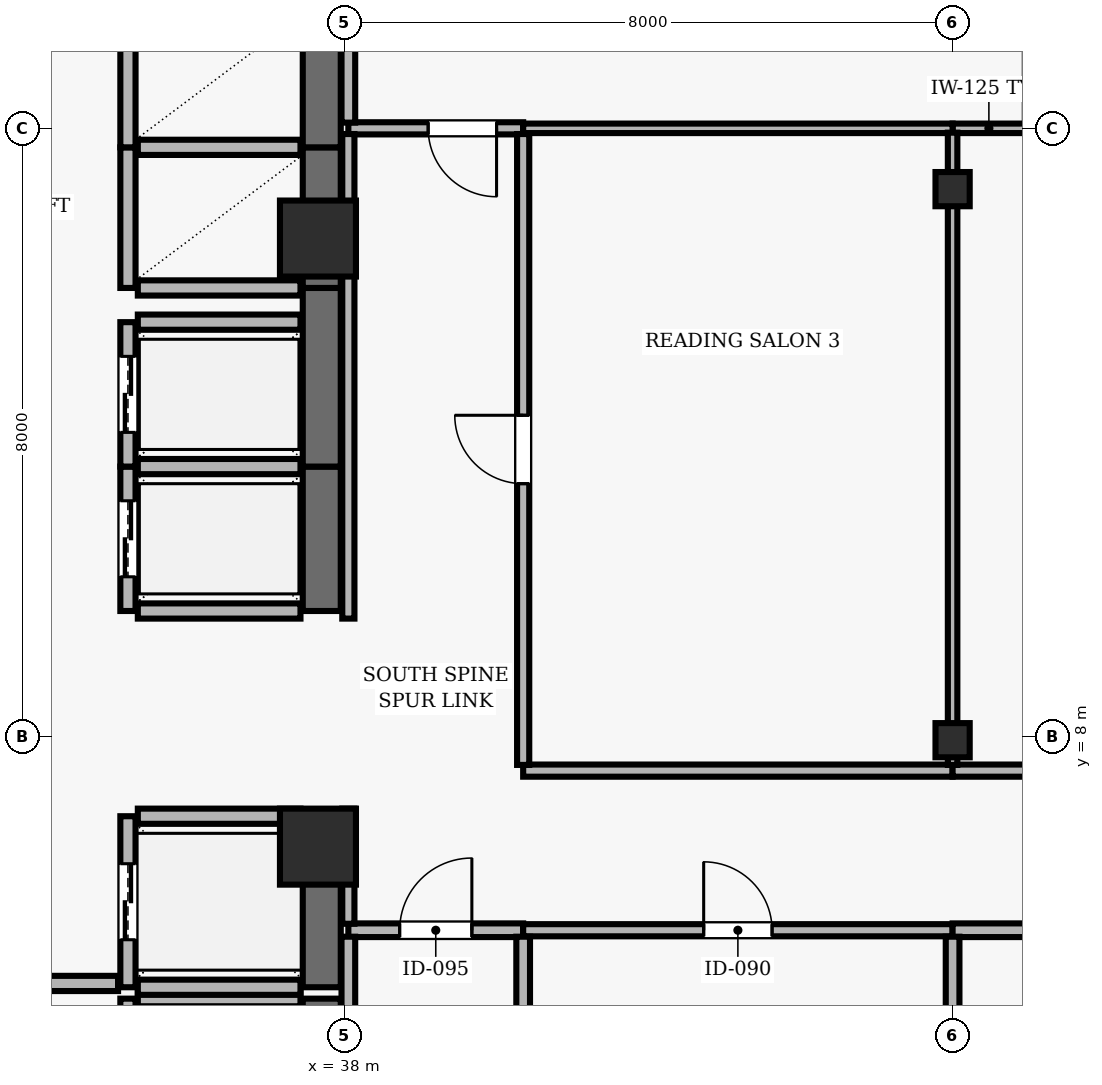
"""IFC4 building model, lengths in metres.
Left out: names, types, materials, properties, quantities, classifications, styles, units other than length and angle.
Written with IfcOpenShell. Run it as: python <this file> out.ifc"""

import sys

from ifc_helpers import new_model, si_unit, direction, frame, frame_2d, origin, origin_2d, place, context, subcontext, project, spatial, rectangle, hollow_rectangle, extrude, element, fill, save


model = new_model("IFC4")
c1 = context("Model", 3, precision=1e-05, world=origin(), true_north=direction((0.0, 1.0)))
c2 = subcontext(c1, "Body", "Model", "MODEL_VIEW")
j1 = project(units=[si_unit("LENGTHUNIT", "METRE"), si_unit("PLANEANGLEUNIT", "RADIAN")], contexts=[c1])
p1 = place(None, origin())
s1 = spatial("IfcSite", under=j1, at=p1, CompositionType="ELEMENT")
p2 = place(p1, origin())
s2 = spatial("IfcBuilding", under=s1, at=p2, CompositionType="ELEMENT")
p3 = place(p2, frame((0.0, 0.0, 199.2)))
s3 = spatial("IfcBuildingStorey", under=s2, at=p3, CompositionType="ELEMENT", Elevation=199.2)
for number, where, z_axis, x_axis in (
    (1, (37.65, 6.55, 0.0), (0.0, 0.0, 1.0), (1.0, 0.0, 0.0)),
    (2, (37.65, 14.55, 0.0), (0.0, 0.0, 1.0), (1.0, 0.0, 0.0)),
):
    element("IfcColumn", number, at=place(p3, frame(where, z_axis=z_axis, x_axis=x_axis)), inside=s3, PredefinedType="COLUMN", context=c2, shape_type="SweptSolid", body=[
        extrude(rectangle(XDim=1.0, YDim=1.0, at=origin_2d()), origin(), (0.0, 0.0, 1.0), 3.9),
    ])
for number, where, z_axis, x_axis in (
    (3, (46.0, 7.95, 0.0), (0.0, 0.0, 1.0), (1.0, 0.0, 0.0)),
    (4, (46.0, 15.2, 0.0), (0.0, 0.0, 1.0), (1.0, 0.0, 0.0)),
):
    element("IfcColumn", number, at=place(p3, frame(where, z_axis=z_axis, x_axis=x_axis)), inside=s3, PredefinedType="COLUMN", context=c2, shape_type="SweptSolid", body=[
        extrude(hollow_rectangle(XDim=0.45, YDim=0.45, WallThickness=0.02, at=origin_2d()), origin(), (0.0, 0.0, 1.0), 3.9),
    ])
p4 = place(p3, frame((35.15, 4.55, 0.0), z_axis=(0.0, 0.0, 1.0), x_axis=(0.0, -1.0, 0.0)))
e5 = element("IfcWall", 5, at=p4, inside=s3, PredefinedType="SOLIDWALL", context=c2, shape_type="SweptSolid", body=[
    extrude(rectangle(XDim=2.1, YDim=0.2, at=frame_2d((1.05, 0.0))), origin(), (0.0, 0.0, 1.0), 3.69),
])
p5 = place(p4, frame((0.45, 0.0, 0.0)))
e6 = element("IfcOpeningElement", 6, at=p5, cuts=e5, PredefinedType="OPENING", context=c2, shape_type="SweptSolid", body=[
    extrude(rectangle(XDim=1.2, YDim=2.15, at=frame_2d((0.6, 1.075))), frame((0.0, 0.11, 0.0), z_axis=(0.0, -1.0, 0.0), x_axis=(1.0, 0.0, 0.0)), (0.0, 0.0, 1.0), 0.22),
])
p6 = place(p3, frame((37.7, 2.45, 0.0), z_axis=(0.0, 0.0, 1.0), x_axis=(0.0, 1.0, 0.0)))
e7 = element("IfcWall", 7, at=p6, inside=s3, PredefinedType="SHEAR", context=c2, shape_type="SweptSolid", body=[
    extrude(rectangle(XDim=2.1, YDim=0.5, at=frame_2d((1.05, 0.0))), origin(), (0.0, 0.0, 1.0), 3.69),
])
p7 = place(p3, frame((37.42, 4.55, 0.0), z_axis=(0.0, 0.0, 1.0), x_axis=(-1.0, 0.0, 0.0)))
e8 = element("IfcWall", 8, at=p7, inside=s3, PredefinedType="SOLIDWALL", context=c2, shape_type="SweptSolid", body=[
    extrude(rectangle(XDim=2.14, YDim=0.2, at=frame_2d((1.07, 0.0))), origin(), (0.0, 0.0, 1.0), 3.69),
])
p8 = place(p3, frame((35.15, 6.95, 0.0), z_axis=(0.0, 0.0, 1.0), x_axis=(0.0, -1.0, 0.0)))
e9 = element("IfcWall", 9, at=p8, inside=s3, PredefinedType="SOLIDWALL", context=c2, shape_type="SweptSolid", body=[
    extrude(rectangle(XDim=2.25, YDim=0.2, at=frame_2d((1.125, 0.0))), origin(), (0.0, 0.0, 1.0), 3.69),
])
p9 = place(p8, frame((0.625, 0.0, 0.0)))
e10 = element("IfcOpeningElement", 10, at=p9, cuts=e9, PredefinedType="OPENING", context=c2, shape_type="SweptSolid", body=[
    extrude(rectangle(XDim=1.0, YDim=2.1, at=frame_2d((0.5, 1.05))), frame((0.0, 0.11, 0.0), z_axis=(0.0, -1.0, 0.0), x_axis=(1.0, 0.0, 0.0)), (0.0, 0.0, 1.0), 0.22),
])
p10 = place(p3, frame((37.7, 4.7, 0.0), z_axis=(0.0, 0.0, 1.0), x_axis=(0.0, 1.0, 0.0)))
e11 = element("IfcWall", 11, at=p10, inside=s3, PredefinedType="SHEAR", context=c2, shape_type="SweptSolid", body=[
    extrude(rectangle(XDim=2.25, YDim=0.5, at=frame_2d((1.125, 0.0))), origin(), (0.0, 0.0, 1.0), 3.69),
])
for number, where, z_axis, x_axis in (
    (12, (35.28, 4.7, 0.0), (0.0, 0.0, 1.0), (1.0, 0.0, 0.0)),
    (13, (37.42, 6.95, 0.0), (0.0, 0.0, 1.0), (-1.0, 0.0, 0.0)),
):
    element("IfcWall", number, at=place(p3, frame(where, z_axis=z_axis, x_axis=x_axis)), inside=s3, PredefinedType="SOLIDWALL", context=c2, shape_type="SweptSolid", body=[
        extrude(rectangle(XDim=2.14, YDim=0.2, at=frame_2d((1.07, 0.0))), origin(), (0.0, 0.0, 1.0), 3.69),
    ])
p11 = place(p3, frame((35.15, 11.55, 0.0), z_axis=(0.0, 0.0, 1.0), x_axis=(0.0, -1.0, 0.0)))
e14 = element("IfcWall", 14, at=p11, inside=s3, PredefinedType="SOLIDWALL", context=c2, shape_type="SweptSolid", body=[
    extrude(rectangle(XDim=1.9, YDim=0.2, at=frame_2d((0.95, 0.0))), origin(), (0.0, 0.0, 1.0), 3.69),
])
p12 = place(p11, frame((0.45, 0.0, 0.0)))
e15 = element("IfcOpeningElement", 15, at=p12, cuts=e14, PredefinedType="OPENING", context=c2, shape_type="SweptSolid", body=[
    extrude(rectangle(XDim=1.0, YDim=2.1, at=frame_2d((0.5, 1.05))), frame((0.0, 0.11, 0.0), z_axis=(0.0, -1.0, 0.0), x_axis=(1.0, 0.0, 0.0)), (0.0, 0.0, 1.0), 0.22),
])
p13 = place(p3, frame((37.7, 9.65, 0.0), z_axis=(0.0, 0.0, 1.0), x_axis=(0.0, 1.0, 0.0)))
e16 = element("IfcWall", 16, at=p13, inside=s3, PredefinedType="SHEAR", context=c2, shape_type="SweptSolid", body=[
    extrude(rectangle(XDim=1.9, YDim=0.5, at=frame_2d((0.95, 0.0))), origin(), (0.0, 0.0, 1.0), 3.69),
])
for number, where, z_axis, x_axis in (
    (17, (35.28, 9.65, 0.0), (0.0, 0.0, 1.0), (1.0, 0.0, 0.0)),
    (18, (37.42, 11.55, 0.0), (0.0, 0.0, 1.0), (-1.0, 0.0, 0.0)),
):
    element("IfcWall", number, at=place(p3, frame(where, z_axis=z_axis, x_axis=x_axis)), inside=s3, PredefinedType="SOLIDWALL", context=c2, shape_type="SweptSolid", body=[
        extrude(rectangle(XDim=2.14, YDim=0.2, at=frame_2d((1.07, 0.0))), origin(), (0.0, 0.0, 1.0), 3.69),
    ])
p14 = place(p3, frame((35.15, 13.45, 0.0), z_axis=(0.0, 0.0, 1.0), x_axis=(0.0, -1.0, 0.0)))
e19 = element("IfcWall", 19, at=p14, inside=s3, PredefinedType="SOLIDWALL", context=c2, shape_type="SweptSolid", body=[
    extrude(rectangle(XDim=1.9, YDim=0.2, at=frame_2d((0.95, 0.0))), origin(), (0.0, 0.0, 1.0), 3.69),
])
p15 = place(p14, frame((0.45, 0.0, 0.0)))
e20 = element("IfcOpeningElement", 20, at=p15, cuts=e19, PredefinedType="OPENING", context=c2, shape_type="SweptSolid", body=[
    extrude(rectangle(XDim=1.0, YDim=2.1, at=frame_2d((0.5, 1.05))), frame((0.0, 0.11, 0.0), z_axis=(0.0, -1.0, 0.0), x_axis=(1.0, 0.0, 0.0)), (0.0, 0.0, 1.0), 0.22),
])
p16 = place(p3, frame((37.7, 11.55, 0.0), z_axis=(0.0, 0.0, 1.0), x_axis=(0.0, 1.0, 0.0)))
e21 = element("IfcWall", 21, at=p16, inside=s3, PredefinedType="SHEAR", context=c2, shape_type="SweptSolid", body=[
    extrude(rectangle(XDim=2.35, YDim=0.5, at=frame_2d((1.175, 0.0))), origin(), (0.0, 0.0, 1.0), 3.69),
])
p17 = place(p3, frame((37.42, 13.45, 0.0), z_axis=(0.0, 0.0, 1.0), x_axis=(-1.0, 0.0, 0.0)))
e22 = element("IfcWall", 22, at=p17, inside=s3, PredefinedType="SOLIDWALL", context=c2, shape_type="SweptSolid", body=[
    extrude(rectangle(XDim=2.14, YDim=0.2, at=frame_2d((1.07, 0.0))), origin(), (0.0, 0.0, 1.0), 3.69),
])
p18 = place(p3, frame((35.15, 15.75, 0.0), z_axis=(0.0, 0.0, 1.0), x_axis=(0.0, -1.0, 0.0)))
e23 = element("IfcWall", 23, at=p18, inside=s3, PredefinedType="SOLIDWALL", context=c2, shape_type="SweptSolid", body=[
    extrude(rectangle(XDim=1.85, YDim=0.2, at=frame_2d((0.925, 0.0))), origin(), (0.0, 0.0, 1.0), 3.69),
])
p19 = place(p3, frame((37.7, 13.9, 0.0), z_axis=(0.0, 0.0, 1.0), x_axis=(0.0, 1.0, 0.0)))
e24 = element("IfcWall", 24, at=p19, inside=s3, PredefinedType="SHEAR", context=c2, shape_type="SweptSolid", body=[
    extrude(rectangle(XDim=1.85, YDim=0.5, at=frame_2d((0.925, 0.0))), origin(), (0.0, 0.0, 1.0), 3.69),
])
for number, where, z_axis, x_axis in (
    (25, (35.28, 13.9, 0.0), (0.0, 0.0, 1.0), (1.0, 0.0, 0.0)),
    (26, (37.42, 15.75, 0.0), (0.0, 0.0, 1.0), (-1.0, 0.0, 0.0)),
):
    element("IfcWall", number, at=place(p3, frame(where, z_axis=z_axis, x_axis=x_axis)), inside=s3, PredefinedType="SOLIDWALL", context=c2, shape_type="SweptSolid", body=[
        extrude(rectangle(XDim=2.14, YDim=0.2, at=frame_2d((1.07, 0.0))), origin(), (0.0, 0.0, 1.0), 3.69),
    ])
p20 = place(p3, frame((35.15, 17.6, 0.0), z_axis=(0.0, 0.0, 1.0), x_axis=(0.0, -1.0, 0.0)))
e27 = element("IfcWall", 27, at=p20, inside=s3, PredefinedType="SOLIDWALL", context=c2, shape_type="SweptSolid", body=[
    extrude(rectangle(XDim=1.85, YDim=0.2, at=frame_2d((0.925, 0.0))), origin(), (0.0, 0.0, 1.0), 3.69),
])
p21 = place(p3, frame((37.7, 15.75, 0.0), z_axis=(0.0, 0.0, 1.0), x_axis=(0.0, 1.0, 0.0)))
e28 = element("IfcWall", 28, at=p21, inside=s3, PredefinedType="SHEAR", context=c2, shape_type="SweptSolid", body=[
    extrude(rectangle(XDim=1.85, YDim=0.5, at=frame_2d((0.925, 0.0))), origin(), (0.0, 0.0, 1.0), 3.69),
])
p22 = place(p3, frame((35.02, 4.75, 0.0), z_axis=(0.0, 0.0, 1.0), x_axis=(-1.0, 0.0, 0.0)))
e29 = element("IfcWall", 29, at=p22, inside=s3, PredefinedType="SOLIDWALL", context=c2, shape_type="SweptSolid", body=[
    extrude(rectangle(XDim=3.11, YDim=0.2, at=frame_2d((1.555, 0.0))), origin(), (0.0, 0.0, 1.0), 3.69),
])
p23 = place(p22, frame((1.03, 0.0, 0.0)))
e30 = element("IfcOpeningElement", 30, at=p23, cuts=e29, PredefinedType="OPENING", context=c2, shape_type="SweptSolid", body=[
    extrude(rectangle(XDim=1.05, YDim=2.15, at=frame_2d((0.525, 1.075))), frame((0.0, 0.11, 0.0), z_axis=(0.0, -1.0, 0.0), x_axis=(1.0, 0.0, 0.0)), (0.0, 0.0, 1.0), 0.22),
])
p24 = place(p3, frame((38.05, 5.45, 0.0), z_axis=(0.0, 0.0, 1.0), x_axis=(1.0, 0.0, 0.0)))
e31 = element("IfcWall", 31, at=p24, inside=s3, PredefinedType="PARTITIONING", context=c2, shape_type="SweptSolid", body=[
    extrude(rectangle(XDim=2.3, YDim=0.18, at=frame_2d((1.15, 0.0))), origin(), (0.0, 0.0, 1.0), 3.343),
])
p25 = place(p24, frame((0.675, 0.0, 0.0)))
e32 = element("IfcOpeningElement", 32, at=p25, cuts=e31, PredefinedType="OPENING", context=c2, shape_type="SweptSolid", body=[
    extrude(rectangle(XDim=0.95, YDim=2.1, at=frame_2d((0.475, 1.05))), frame((0.0, 0.1, 0.0), z_axis=(0.0, -1.0, 0.0), x_axis=(1.0, 0.0, 0.0)), (0.0, 0.0, 1.0), 0.2),
])
p26 = place(p3, frame((40.35, 5.45, 0.0), z_axis=(0.0, 0.0, 1.0), x_axis=(1.0, 0.0, 0.0)))
e33 = element("IfcWall", 33, at=p26, inside=s3, PredefinedType="PARTITIONING", context=c2, shape_type="SweptSolid", body=[
    extrude(rectangle(XDim=5.65, YDim=0.16, at=frame_2d((2.825, 0.0))), origin(), (0.0, 0.0, 1.0), 3.343),
])
p27 = place(p26, frame((2.375, 0.0, 0.0)))
e34 = element("IfcOpeningElement", 34, at=p27, cuts=e33, PredefinedType="OPENING", context=c2, shape_type="SweptSolid", body=[
    extrude(rectangle(XDim=0.9, YDim=2.1, at=frame_2d((0.45, 1.05))), frame((0.0, 0.09, 0.0), z_axis=(0.0, -1.0, 0.0), x_axis=(1.0, 0.0, 0.0)), (0.0, 0.0, 1.0), 0.18),
])
p28 = place(p3, frame((40.35, 16.0, 0.0), z_axis=(0.0, 0.0, 1.0), x_axis=(-1.0, 0.0, 0.0)))
e35 = element("IfcWall", 35, at=p28, inside=s3, PredefinedType="PARTITIONING", context=c2, shape_type="SweptSolid", body=[
    extrude(rectangle(XDim=2.3, YDim=0.16, at=frame_2d((1.15, 0.0))), origin(), (0.0, 0.0, 1.0), 3.69),
])
p29 = place(p28, frame((0.35, 0.0, 0.0)))
e36 = element("IfcOpeningElement", 36, at=p29, cuts=e35, PredefinedType="OPENING", context=c2, shape_type="SweptSolid", body=[
    extrude(rectangle(XDim=0.9, YDim=2.1, at=frame_2d((0.45, 1.05))), frame((0.0, 0.09, 0.0), z_axis=(0.0, -1.0, 0.0), x_axis=(1.0, 0.0, 0.0)), (0.0, 0.0, 1.0), 0.18),
])
p30 = place(p3, frame((46.0, 5.45, 0.0), z_axis=(0.0, 0.0, 1.0), x_axis=(1.0, 0.0, 0.0)))
e37 = element("IfcWall", 37, at=p30, inside=s3, PredefinedType="PARTITIONING", context=c2, shape_type="SweptSolid", body=[
    extrude(rectangle(XDim=7.27, YDim=0.18, at=frame_2d((3.635, 0.0))), origin(), (0.0, 0.0, 1.0), 3.343),
])
p31 = place(p30, frame((3.16, 0.0, 0.0)))
e38 = element("IfcOpeningElement", 38, at=p31, cuts=e37, PredefinedType="OPENING", context=c2, shape_type="SweptSolid", body=[
    extrude(rectangle(XDim=0.95, YDim=2.1, at=frame_2d((0.475, 1.05))), frame((0.0, 0.1, 0.0), z_axis=(0.0, -1.0, 0.0), x_axis=(1.0, 0.0, 0.0)), (0.0, 0.0, 1.0), 0.2),
])
p32 = place(p3, frame((46.0, 7.55, 0.0), z_axis=(0.0, 0.0, 1.0), x_axis=(-1.0, 0.0, 0.0)))
e39 = element("IfcWall", 39, at=p32, inside=s3, PredefinedType="PARTITIONING", context=c2, shape_type="SweptSolid", body=[
    extrude(rectangle(XDim=5.65, YDim=0.16, at=frame_2d((2.825, 0.0))), origin(), (0.0, 0.0, 1.0), 3.139),
])
p33 = place(p3, frame((46.0, 16.0, 0.0), z_axis=(0.0, 0.0, 1.0), x_axis=(1.0, 0.0, 0.0)))
e40 = element("IfcWall", 40, at=p33, inside=s3, PredefinedType="PARTITIONING", context=c2, shape_type="SweptSolid", body=[
    extrude(rectangle(XDim=0.955, YDim=0.125, at=frame_2d((0.478, 0.0))), origin(), (0.0, 0.0, 1.0), 3.39),
])
p34 = place(p3, frame((46.0, 16.0, 0.0), z_axis=(0.0, 0.0, 1.0), x_axis=(-1.0, 0.0, 0.0)))
e41 = element("IfcWall", 41, at=p34, inside=s3, PredefinedType="PARTITIONING", context=c2, shape_type="SweptSolid", body=[
    extrude(rectangle(XDim=5.65, YDim=0.125, at=frame_2d((2.825, 0.0))), origin(), (0.0, 0.0, 1.0), 3.69),
])
p35 = place(p3, frame((53.27, 7.55, 0.0), z_axis=(0.0, 0.0, 1.0), x_axis=(-1.0, 0.0, 0.0)))
e42 = element("IfcWall", 42, at=p35, inside=s3, PredefinedType="PARTITIONING", context=c2, shape_type="SweptSolid", body=[
    extrude(rectangle(XDim=7.27, YDim=0.16, at=frame_2d((3.635, 0.0))), origin(), (0.0, 0.0, 1.0), 3.139),
])
p36 = place(p35, frame((3.185, 0.0, 0.0)))
e43 = element("IfcOpeningElement", 43, at=p36, cuts=e42, PredefinedType="OPENING", context=c2, shape_type="SweptSolid", body=[
    extrude(rectangle(XDim=0.9, YDim=2.1, at=frame_2d((0.45, 1.05))), frame((0.0, 0.09, 0.0), z_axis=(0.0, -1.0, 0.0), x_axis=(1.0, 0.0, 0.0)), (0.0, 0.0, 1.0), 0.18),
])
p37 = place(p3, frame((38.05, 5.365, 0.0), z_axis=(0.0, 0.0, 1.0), x_axis=(0.0, -1.0, 0.0)))
e44 = element("IfcWall", 44, at=p37, inside=s3, PredefinedType="PARTITIONING", context=c2, shape_type="SweptSolid", body=[
    extrude(rectangle(XDim=5.22, YDim=0.18, at=frame_2d((2.61, 0.0))), origin(), (0.0, 0.0, 1.0), 3.139),
])
p38 = place(p3, frame((38.05, 7.05, 0.0), z_axis=(0.0, 0.0, 1.0), x_axis=(0.0, -1.0, 0.0)))
e45 = element("IfcWall", 45, at=p38, inside=s3, PredefinedType="PARTITIONING", context=c2, shape_type="SweptSolid", body=[
    extrude(rectangle(XDim=1.515, YDim=0.16, at=frame_2d((0.758, 0.0))), origin(), (0.0, 0.0, 1.0), 3.139),
])
p39 = place(p3, frame((38.05, 15.925, 0.0), z_axis=(0.0, 0.0, 1.0), x_axis=(0.0, -1.0, 0.0)))
e46 = element("IfcWall", 46, at=p39, inside=s3, PredefinedType="PARTITIONING", context=c2, shape_type="SweptSolid", body=[
    extrude(rectangle(XDim=6.375, YDim=0.16, at=frame_2d((3.188, 0.0))), origin(), (0.0, 0.0, 1.0), 3.139),
])
p40 = place(p3, frame((38.05, 23.19, 0.0), z_axis=(0.0, 0.0, 1.0), x_axis=(0.0, -1.0, 0.0)))
e47 = element("IfcWall", 47, at=p40, inside=s3, PredefinedType="PARTITIONING", context=c2, shape_type="SweptSolid", body=[
    extrude(rectangle(XDim=7.115, YDim=0.18, at=frame_2d((3.558, 0.0))), origin(), (0.0, 0.0, 1.0), 3.139),
])
p41 = place(p3, frame((40.35, 0.145, 0.0), z_axis=(0.0, 0.0, 1.0), x_axis=(0.0, 1.0, 0.0)))
e48 = element("IfcWall", 48, at=p41, inside=s3, PredefinedType="PARTITIONING", context=c2, shape_type="SweptSolid", body=[
    extrude(rectangle(XDim=5.22, YDim=0.18, at=frame_2d((2.61, 0.0))), origin(), (0.0, 0.0, 1.0), 3.69),
])
p42 = place(p3, frame((40.35, 7.625, 0.0), z_axis=(0.0, 0.0, 1.0), x_axis=(0.0, 1.0, 0.0)))
e49 = element("IfcWall", 49, at=p42, inside=s3, PredefinedType="PARTITIONING", context=c2, shape_type="SweptSolid", body=[
    extrude(rectangle(XDim=8.3, YDim=0.16, at=frame_2d((4.15, 0.0))), origin(), (0.0, 0.0, 1.0), 3.343),
])
p43 = place(p42, frame((3.7, 0.0, 0.0)))
e50 = element("IfcOpeningElement", 50, at=p43, cuts=e49, PredefinedType="OPENING", context=c2, shape_type="SweptSolid", body=[
    extrude(rectangle(XDim=0.9, YDim=2.1, at=frame_2d((0.45, 1.05))), frame((0.0, 0.09, 0.0), z_axis=(0.0, -1.0, 0.0), x_axis=(1.0, 0.0, 0.0)), (0.0, 0.0, 1.0), 0.18),
])
p44 = place(p3, frame((46.0, 0.145, 0.0), z_axis=(0.0, 0.0, 1.0), x_axis=(0.0, 1.0, 0.0)))
e51 = element("IfcWall", 51, at=p44, inside=s3, PredefinedType="PARTITIONING", context=c2, shape_type="SweptSolid", body=[
    extrude(rectangle(XDim=5.22, YDim=0.18, at=frame_2d((2.61, 0.0))), origin(), (0.0, 0.0, 1.0), 3.139),
])
p45 = place(p3, frame((46.0, 7.625, 0.0), z_axis=(0.0, 0.0, 1.0), x_axis=(0.0, 1.0, 0.0)))
e52 = element("IfcWall", 52, at=p45, inside=s3, PredefinedType="PARTITIONING", context=c2, shape_type="SweptSolid", body=[
    extrude(rectangle(XDim=8.318, YDim=0.125, at=frame_2d((4.159, 0.0))), origin(), (0.0, 0.0, 1.0), 3.139),
])
p46 = place(p9, origin())
e53 = element("IfcDoor", 53, at=p46, inside=s3, OperationType="DOUBLE_DOOR_SLIDING", PredefinedType="DOOR", context=c2, shape_type="SweptSolid", body=[
    extrude(rectangle(XDim=1.0, YDim=2.1, at=frame_2d((0.5, 1.05))), frame((0.0, 0.025, 0.0), z_axis=(0.0, -1.0, 0.0), x_axis=(1.0, 0.0, 0.0)), (0.0, 0.0, 1.0), 0.05),
])
fill(e10, e53)
p47 = place(p12, origin())
e54 = element("IfcDoor", 54, at=p47, inside=s3, OperationType="DOUBLE_DOOR_SLIDING", PredefinedType="DOOR", context=c2, shape_type="SweptSolid", body=[
    extrude(rectangle(XDim=1.0, YDim=2.1, at=frame_2d((0.5, 1.05))), frame((0.0, 0.025, 0.0), z_axis=(0.0, -1.0, 0.0), x_axis=(1.0, 0.0, 0.0)), (0.0, 0.0, 1.0), 0.05),
])
fill(e15, e54)
p48 = place(p15, origin())
e55 = element("IfcDoor", 55, at=p48, inside=s3, OperationType="DOUBLE_DOOR_SLIDING", PredefinedType="DOOR", context=c2, shape_type="SweptSolid", body=[
    extrude(rectangle(XDim=1.0, YDim=2.1, at=frame_2d((0.5, 1.05))), frame((0.0, 0.025, 0.0), z_axis=(0.0, -1.0, 0.0), x_axis=(1.0, 0.0, 0.0)), (0.0, 0.0, 1.0), 0.05),
])
fill(e20, e55)
p49 = place(p25, origin())
e56 = element("IfcDoor", 56, at=p49, inside=s3, OperationType="SINGLE_SWING_RIGHT", PredefinedType="DOOR", context=c2, shape_type="SweptSolid", body=[
    extrude(rectangle(XDim=0.95, YDim=2.1, at=frame_2d((0.475, 1.05))), frame((0.0, 0.025, 0.0), z_axis=(0.0, -1.0, 0.0), x_axis=(1.0, 0.0, 0.0)), (0.0, 0.0, 1.0), 0.05),
])
fill(e32, e56)
p50 = place(p27, origin())
e57 = element("IfcDoor", 57, at=p50, inside=s3, OperationType="SINGLE_SWING_LEFT", PredefinedType="DOOR", context=c2, shape_type="SweptSolid", body=[
    extrude(rectangle(XDim=0.9, YDim=2.1, at=frame_2d((0.45, 1.05))), frame((0.0, 0.025, 0.0), z_axis=(0.0, -1.0, 0.0), x_axis=(1.0, 0.0, 0.0)), (0.0, 0.0, 1.0), 0.05),
])
fill(e34, e57)
p51 = place(p43, origin())
e58 = element("IfcDoor", 58, at=p51, inside=s3, OperationType="SINGLE_SWING_RIGHT", PredefinedType="DOOR", context=c2, shape_type="SweptSolid", body=[
    extrude(rectangle(XDim=0.9, YDim=2.1, at=frame_2d((0.45, 1.05))), frame((0.0, 0.025, 0.0), z_axis=(0.0, -1.0, 0.0), x_axis=(1.0, 0.0, 0.0)), (0.0, 0.0, 1.0), 0.05),
])
fill(e50, e58)
p52 = place(p29, origin())
e59 = element("IfcDoor", 59, at=p52, inside=s3, OperationType="SINGLE_SWING_LEFT", PredefinedType="DOOR", context=c2, shape_type="SweptSolid", body=[
    extrude(rectangle(XDim=0.9, YDim=2.1, at=frame_2d((0.45, 1.05))), frame((0.0, 0.025, 0.0), z_axis=(0.0, -1.0, 0.0), x_axis=(1.0, 0.0, 0.0)), (0.0, 0.0, 1.0), 0.05),
])
fill(e36, e59)
save(model, sys.argv[1])
